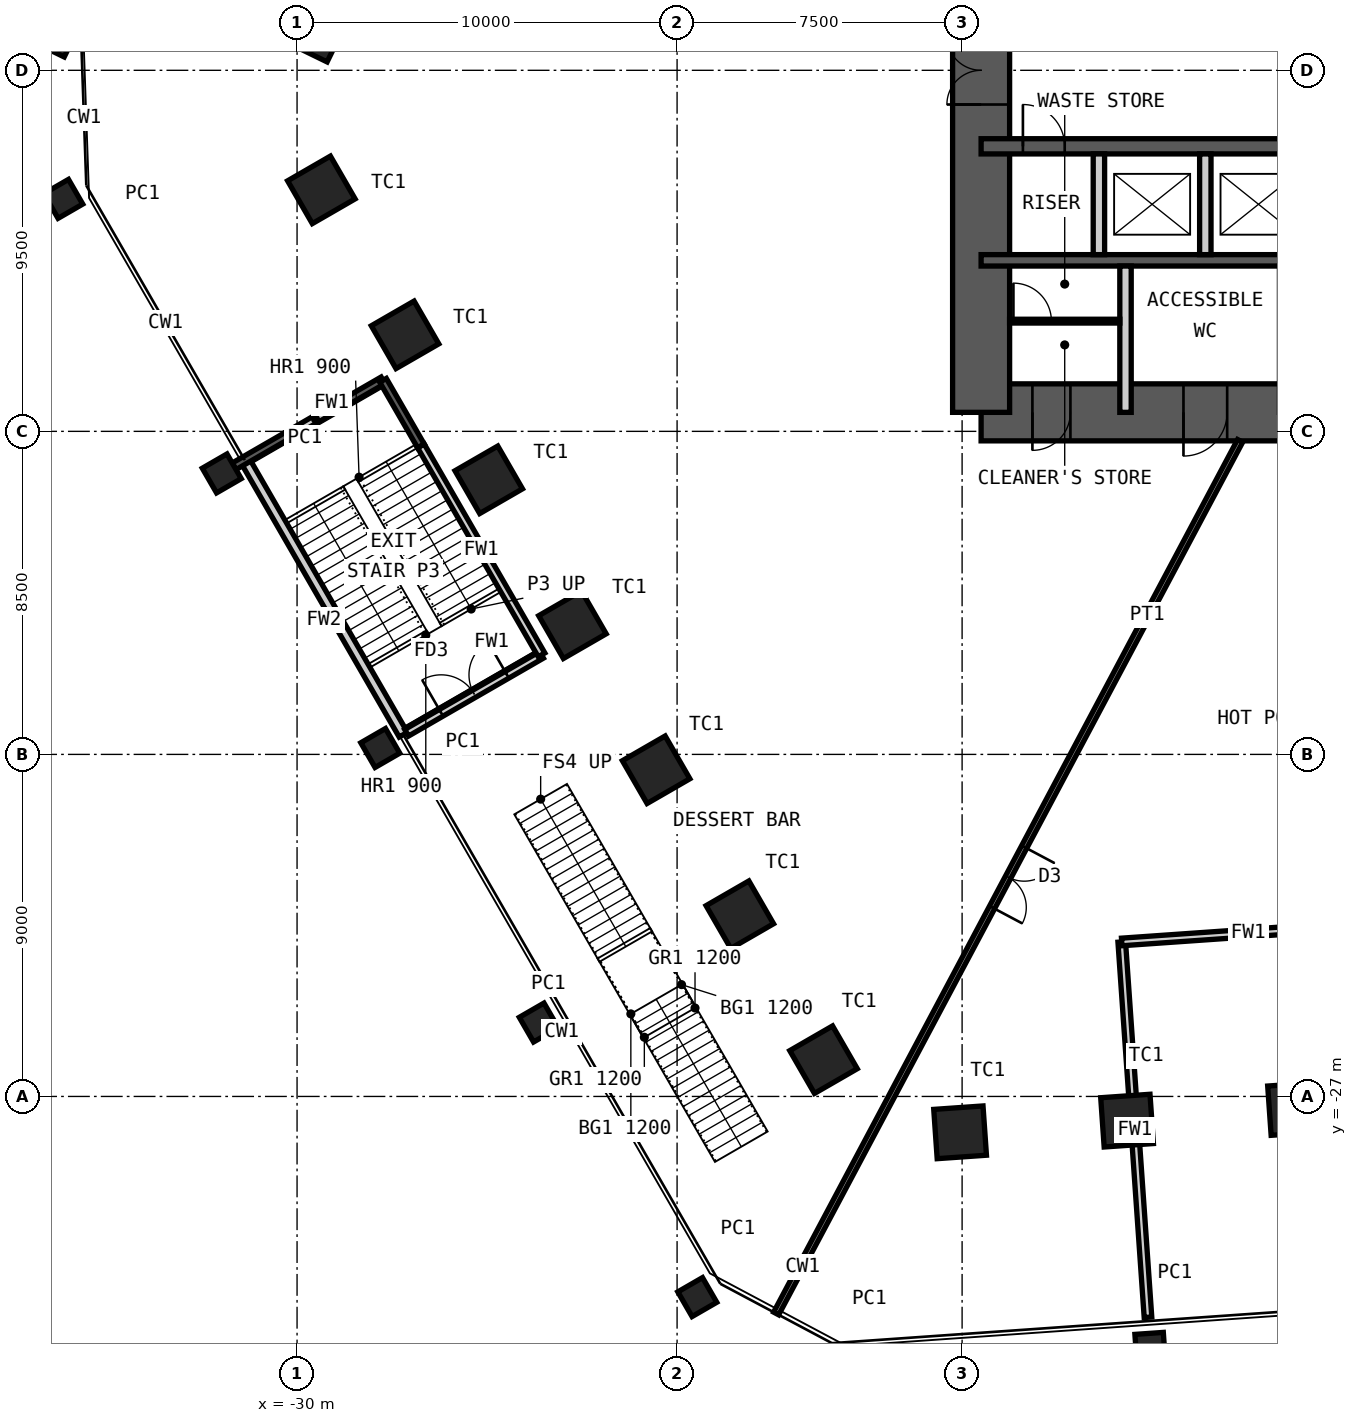
"""IFC4 building model, lengths in metres.
Left out: names, types, materials, properties, quantities, classifications, styles, units other than length and angle.
Written with IfcOpenShell. Run it as: python <this file> out.ifc"""

import sys

from ifc_helpers import new_model, si_unit, direction, frame, frame_2d, origin, origin_2d, place, context, subcontext, project, spatial, rectangle, hollow_rectangle, extrude, element, fill, save


model = new_model("IFC4")
c1 = context("Model", 3, precision=1e-05, world=origin(), true_north=direction((0.0, 1.0)))
c2 = subcontext(c1, "Body", "Model", "MODEL_VIEW")
j1 = project(units=[si_unit("LENGTHUNIT", "METRE"), si_unit("PLANEANGLEUNIT", "RADIAN")], contexts=[c1])
p1 = place(None, origin())
s1 = spatial("IfcSite", under=j1, at=p1, CompositionType="ELEMENT")
p2 = place(p1, origin())
s2 = spatial("IfcBuilding", under=s1, at=p2, CompositionType="ELEMENT")
p3 = place(p2, frame((0.0, 0.0, 6.0)))
s3 = spatial("IfcBuildingStorey", under=s2, at=p3, CompositionType="ELEMENT", Elevation=6.0)
for number, where, z_axis, x_axis in (
    (1, (-3.765, -27.329, 0.0), (0.0, 0.0, 1.0), (0.998, 0.07, 0.0)),
    (2, (-8.159, -27.636, 0.0), (0.0, 0.0, 1.0), (0.998, 0.07, 0.0)),
    (3, (-12.553, -27.944, 0.0), (0.0, 0.0, 1.0), (0.998, 0.07, 0.0)),
    (4, (-16.147, -26.033, 0.0), (0.0, 0.0, 1.0), (0.5, -0.866, 0.0)),
    (5, (-18.349, -22.218, 0.0), (0.0, 0.0, 1.0), (0.5, -0.866, 0.0)),
    (6, (-20.552, -18.404, 0.0), (0.0, 0.0, 1.0), (0.5, -0.866, 0.0)),
    (7, (-22.754, -14.589, 0.0), (0.0, 0.0, 1.0), (0.5, -0.866, 0.0)),
    (8, (-24.956, -10.775, 0.0), (0.0, 0.0, 1.0), (0.5, -0.866, 0.0)),
    (9, (-27.158, -6.96, 0.0), (0.0, 0.0, 1.0), (0.5, -0.866, 0.0)),
    (10, (-29.361, -3.146, 0.0), (0.0, 0.0, 1.0), (0.5, -0.866, 0.0)),
    (11, (-29.509, 1.09, 0.0), (0.0, 0.0, 1.0), (-0.438, -0.899, 0.0)),
):
    element("IfcColumn", number, at=place(p3, frame(where, z_axis=z_axis, x_axis=x_axis)), inside=s3, PredefinedType="COLUMN", context=c2, shape_type="SweptSolid", body=[
        extrude(hollow_rectangle(XDim=1.3, YDim=1.3, WallThickness=0.1, at=origin_2d()), origin(), (0.0, 0.0, 1.0), 6.0),
    ])
for number, where, z_axis, x_axis in (
    (12, (-7.553, -33.609, 0.0), (0.0, 0.0, 1.0), (0.998, 0.07, 0.0)),
    (13, (-19.469, -32.28, 0.0), (0.0, 0.0, 1.0), (0.5, -0.866, 0.0)),
    (14, (-23.639, -25.055, 0.0), (0.0, 0.0, 1.0), (0.5, -0.866, 0.0)),
    (15, (-27.81, -17.831, 0.0), (0.0, 0.0, 1.0), (0.5, -0.866, 0.0)),
    (16, (-31.981, -10.607, 0.0), (0.0, 0.0, 1.0), (0.5, -0.866, 0.0)),
    (17, (-36.3, 0.853, 0.0), (0.0, 0.0, 1.0), (-0.438, -0.899, 0.0)),
    (18, (-36.152, -3.383, 0.0), (0.0, 0.0, 1.0), (0.5, -0.866, 0.0)),
):
    element("IfcColumn", number, at=place(p3, frame(where, z_axis=z_axis, x_axis=x_axis)), inside=s3, PredefinedType="COLUMN", context=c2, shape_type="SweptSolid", body=[
        extrude(hollow_rectangle(XDim=0.75, YDim=0.75, WallThickness=0.036, at=origin_2d()), origin(), (0.0, 0.0, 1.0), 6.0),
    ])
p4 = place(p3, frame((-12.0, -9.0, 0.0), z_axis=(0.0, 0.0, 1.0), x_axis=(1.0, 0.0, 0.0)))
e19 = element("IfcWall", 19, at=p4, inside=s3, PredefinedType="SHEAR", context=c2, shape_type="SweptSolid", body=[
    extrude(rectangle(XDim=24.0, YDim=1.5, at=frame_2d((12.0, 0.0))), origin(), (0.0, 0.0, 1.0), 6.0),
])
p5 = place(p4, frame((1.35, 0.0, 0.0)))
e20 = element("IfcOpeningElement", 20, at=p5, cuts=e19, PredefinedType="OPENING", context=c2, shape_type="SweptSolid", body=[
    extrude(rectangle(XDim=1.0, YDim=2.1, at=frame_2d((0.5, 1.05))), frame((0.0, 0.76, 0.0), z_axis=(0.0, -1.0, 0.0), x_axis=(1.0, 0.0, 0.0)), (0.0, 0.0, 1.0), 1.52),
])
p6 = place(p4, frame((5.325, 0.0, 0.0)))
e21 = element("IfcOpeningElement", 21, at=p6, cuts=e19, PredefinedType="OPENING", context=c2, shape_type="SweptSolid", body=[
    extrude(rectangle(XDim=1.15, YDim=2.1, at=frame_2d((0.575, 1.05))), frame((0.0, 0.76, 0.0), z_axis=(0.0, -1.0, 0.0), x_axis=(1.0, 0.0, 0.0)), (0.0, 0.0, 1.0), 1.52),
])
p7 = place(p4, frame((12.6, 0.0, 0.0)))
e22 = element("IfcOpeningElement", 22, at=p7, cuts=e19, PredefinedType="OPENING", context=c2, shape_type="SweptSolid", body=[
    extrude(rectangle(XDim=1.0, YDim=2.1, at=frame_2d((0.5, 1.05))), frame((0.0, 0.76, 0.0), z_axis=(0.0, -1.0, 0.0), x_axis=(1.0, 0.0, 0.0)), (0.0, 0.0, 1.0), 1.52),
])
p8 = place(p3, frame((-12.0, -9.0, 0.0), z_axis=(0.0, 0.0, 1.0), x_axis=(0.0, 1.0, 0.0)))
e23 = element("IfcWall", 23, at=p8, inside=s3, PredefinedType="SHEAR", context=c2, shape_type="SweptSolid", body=[
    extrude(rectangle(XDim=18.0, YDim=1.5, at=frame_2d((9.0, 0.0))), origin(), (0.0, 0.0, 1.0), 6.0),
])
p9 = place(p8, frame((8.1, 0.0, 0.0)))
e24 = element("IfcOpeningElement", 24, at=p9, cuts=e23, PredefinedType="OPENING", context=c2, shape_type="SweptSolid", body=[
    extrude(rectangle(XDim=1.8, YDim=2.1, at=frame_2d((0.9, 1.05))), frame((0.0, 0.76, 0.0), z_axis=(0.0, -1.0, 0.0), x_axis=(1.0, 0.0, 0.0)), (0.0, 0.0, 1.0), 1.52),
])
p10 = place(p3, frame((-12.0, -2.0, 0.0), z_axis=(0.0, 0.0, 1.0), x_axis=(1.0, 0.0, 0.0)))
e25 = element("IfcWall", 25, at=p10, inside=s3, PredefinedType="SHEAR", context=c2, shape_type="SweptSolid", body=[
    extrude(rectangle(XDim=24.0, YDim=0.4, at=frame_2d((12.0, 0.0))), origin(), (0.0, 0.0, 1.0), 6.0),
])
p11 = place(p10, frame((1.1, 0.0, 0.0)))
e26 = element("IfcOpeningElement", 26, at=p11, cuts=e25, PredefinedType="OPENING", context=c2, shape_type="SweptSolid", body=[
    extrude(rectangle(XDim=1.1, YDim=2.1, at=frame_2d((0.55, 1.05))), frame((0.0, 0.21, 0.0), z_axis=(0.0, -1.0, 0.0), x_axis=(1.0, 0.0, 0.0)), (0.0, 0.0, 1.0), 0.42),
])
p12 = place(p10, frame((13.55, 0.0, 0.0)))
e27 = element("IfcOpeningElement", 27, at=p12, cuts=e25, PredefinedType="OPENING", context=c2, shape_type="SweptSolid", body=[
    extrude(rectangle(XDim=1.1, YDim=2.1, at=frame_2d((0.55, 1.05))), frame((0.0, 0.21, 0.0), z_axis=(0.0, -1.0, 0.0), x_axis=(1.0, 0.0, 0.0)), (0.0, 0.0, 1.0), 0.42),
])
p13 = place(p10, frame((20.7, 0.0, 0.0)))
e28 = element("IfcOpeningElement", 28, at=p13, cuts=e25, PredefinedType="OPENING", context=c2, shape_type="SweptSolid", body=[
    extrude(rectangle(XDim=1.1, YDim=2.1, at=frame_2d((0.55, 1.05))), frame((0.0, 0.21, 0.0), z_axis=(0.0, -1.0, 0.0), x_axis=(1.0, 0.0, 0.0)), (0.0, 0.0, 1.0), 0.42),
])
p14 = place(p3, frame((-12.0, -5.0, 0.0), z_axis=(0.0, 0.0, 1.0), x_axis=(1.0, 0.0, 0.0)))
e29 = element("IfcWall", 29, at=p14, inside=s3, PredefinedType="SHEAR", context=c2, shape_type="SweptSolid", body=[
    extrude(rectangle(XDim=24.0, YDim=0.3, at=frame_2d((12.0, 0.0))), origin(), (0.0, 0.0, 1.0), 6.0),
])
for number, where, z_axis, x_axis in (
    (30, (-8.9, -4.85, 0.0), (0.0, 0.0, 1.0), (0.0, 1.0, 0.0)),
    (31, (-6.1, -4.85, 0.0), (0.0, 0.0, 1.0), (0.0, 1.0, 0.0)),
):
    element("IfcWall", number, at=place(p3, frame(where, z_axis=z_axis, x_axis=x_axis)), inside=s3, PredefinedType="PARTITIONING", context=c2, shape_type="SweptSolid", body=[
        extrude(rectangle(XDim=2.65, YDim=0.3, at=frame_2d((1.325, 0.0))), origin(), (0.0, 0.0, 1.0), 5.78),
    ])
p15 = place(p3, frame((-8.2, -9.0, 0.0), z_axis=(0.0, 0.0, 1.0), x_axis=(0.0, 1.0, 0.0)))
e32 = element("IfcWall", 32, at=p15, inside=s3, PredefinedType="PARTITIONING", context=c2, shape_type="SweptSolid", body=[
    extrude(rectangle(XDim=3.85, YDim=0.3, at=frame_2d((1.925, 0.0))), origin(), (0.0, 0.0, 1.0), 5.78),
])
p16 = place(p3, frame((-27.204, -17.481, 0.0), z_axis=(0.0, 0.0, 1.0), x_axis=(-0.500004511595, 0.866022798998, 0.0)))
e33 = element("IfcWall", 33, at=p16, inside=s3, PredefinedType="SOLIDWALL", context=c2, shape_type="SweptSolid", body=[
    extrude(rectangle(XDim=8.342, YDim=0.25, at=frame_2d((4.171, 0.0))), origin(), (0.0, 0.0, 1.0), 5.75),
])
p17 = place(p3, frame((-11.25, -6.6, 0.0), z_axis=(0.0, 0.0, 1.0), x_axis=(1.0, 0.0, 0.0)))
e34 = element("IfcWall", 34, at=p17, inside=s3, PredefinedType="PARTITIONING", context=c2, shape_type="SweptSolid", body=[
    extrude(rectangle(XDim=2.9, YDim=0.1, at=frame_2d((1.45, 0.0))), origin(), (0.0, 0.0, 1.0), 5.78),
])
p18 = place(p17, frame((0.1, 0.0, 0.0)))
e35 = element("IfcOpeningElement", 35, at=p18, cuts=e34, PredefinedType="OPENING", context=c2, shape_type="SweptSolid", body=[
    extrude(rectangle(XDim=1.0, YDim=2.4, at=frame_2d((0.5, 1.2))), frame((0.0, 0.06, 0.0), z_axis=(0.0, -1.0, 0.0), x_axis=(1.0, 0.0, 0.0)), (0.0, 0.0, 1.0), 0.12),
])
p19 = place(p3, frame((-7.609, -32.811, 0.0), z_axis=(0.0, 0.0, 1.0), x_axis=(-0.069764341483, 0.997563500063, 0.0)))
e36 = element("IfcWall", 36, at=p19, inside=s3, PredefinedType="PARTITIONING", context=c2, shape_type="SweptSolid", body=[
    extrude(rectangle(XDim=9.9, YDim=0.2, at=frame_2d((4.95, 0.0))), origin(), (0.0, 0.0, 1.0), 5.75),
])
p20 = place(p3, frame((8.344, -21.771, 0.0), z_axis=(0.0, 0.0, 1.0), x_axis=(-0.997563959397, -0.069757773133, 0.0)))
e37 = element("IfcWall", 37, at=p20, inside=s3, PredefinedType="PARTITIONING", context=c2, shape_type="SweptSolid", body=[
    extrude(rectangle(XDim=16.684, YDim=0.2, at=frame_2d((8.342, 0.0))), origin(), (0.0, 0.0, 1.0), 5.75),
])
p21 = place(p20, frame((7.342, 0.0, 0.0)))
e38 = element("IfcOpeningElement", 38, at=p21, cuts=e37, PredefinedType="OPENING", context=c2, shape_type="SweptSolid", body=[
    extrude(rectangle(XDim=2.0, YDim=2.4, at=frame_2d((1.0, 1.2))), frame((0.0, 0.11, 0.0), z_axis=(0.0, -1.0, 0.0), x_axis=(1.0, 0.0, 0.0)), (0.0, 0.0, 1.0), 0.22),
])
p22 = place(p3, frame((-5.184, -9.75, 0.0), z_axis=(0.0, 0.0, 1.0), x_axis=(-0.469477354847, -0.882944513141, 0.0)))
e39 = element("IfcWall", 39, at=p22, inside=s3, PredefinedType="PARTITIONING", context=c2, shape_type="SweptSolid", body=[
    extrude(rectangle(XDim=26.005, YDim=0.15, at=frame_2d((13.002, 0.0))), origin(), (0.0, 0.0, 1.0), 5.75),
])
p23 = place(p22, frame((12.103, 0.0, 0.0)))
e40 = element("IfcOpeningElement", 40, at=p23, cuts=e39, PredefinedType="OPENING", context=c2, shape_type="SweptSolid", body=[
    extrude(rectangle(XDim=1.8, YDim=2.4, at=frame_2d((0.9, 1.2))), frame((0.0, 0.085, 0.0), z_axis=(0.0, -1.0, 0.0), x_axis=(1.0, 0.0, 0.0)), (0.0, 0.0, 1.0), 0.17),
])
p24 = place(p3, frame((-27.117, -17.431, 0.0), z_axis=(0.0, 0.0, 1.0), x_axis=(0.8660249478, 0.500000789788, 0.0)))
e41 = element("IfcWall", 41, at=p24, inside=s3, PredefinedType="PARTITIONING", context=c2, shape_type="SweptSolid", body=[
    extrude(rectangle(XDim=4.1, YDim=0.2, at=frame_2d((2.05, 0.0))), origin(), (0.0, 0.0, 1.0), 5.75),
])
p25 = place(p24, frame((1.05, 0.0, 0.0)))
e42 = element("IfcOpeningElement", 42, at=p25, cuts=e41, PredefinedType="OPENING", context=c2, shape_type="SweptSolid", body=[
    extrude(rectangle(XDim=2.0, YDim=2.4, at=frame_2d((1.0, 1.2))), frame((0.0, 0.11, 0.0), z_axis=(0.0, -1.0, 0.0), x_axis=(1.0, 0.0, 0.0)), (0.0, 0.0, 1.0), 0.22),
])
p26 = place(p3, frame((-31.656, -10.419, 0.0), z_axis=(0.0, 0.0, 1.0), x_axis=(0.866053003207, 0.499952193351, 0.0)))
e43 = element("IfcWall", 43, at=p26, inside=s3, PredefinedType="PARTITIONING", context=c2, shape_type="SweptSolid", body=[
    extrude(rectangle(XDim=1.625, YDim=0.2, at=frame_2d((0.812, 0.0))), origin(), (0.0, 0.0, 1.0), 5.75),
])
p27 = place(p3, frame((-23.567, -15.381, 0.0), z_axis=(0.0, 0.0, 1.0), x_axis=(-0.500005339912, 0.866022320763, 0.0)))
e44 = element("IfcWall", 44, at=p27, inside=s3, PredefinedType="PARTITIONING", context=c2, shape_type="SweptSolid", body=[
    extrude(rectangle(XDim=6.35, YDim=0.2, at=frame_2d((3.175, 0.0))), origin(), (0.0, 0.0, 1.0), 5.75),
])
p28 = place(p3, frame((-30.249, -9.607, 0.0), z_axis=(0.0, 0.0, 1.0), x_axis=(0.86605165483, 0.499954529098, 0.0)))
e45 = element("IfcWall", 45, at=p28, inside=s3, PredefinedType="PARTITIONING", context=c2, shape_type="SweptSolid", body=[
    extrude(rectangle(XDim=1.7, YDim=0.2, at=frame_2d((0.85, 0.0))), origin(), (0.0, 0.0, 1.0), 5.75),
])
p29 = place(p3, frame((-28.777, -8.757, 0.0), z_axis=(0.0, 0.0, 1.0), x_axis=(0.866006032174, 0.500033551112, 0.0)))
e46 = element("IfcWall", 46, at=p29, inside=s3, PredefinedType="PARTITIONING", context=c2, shape_type="SweptSolid", body=[
    extrude(rectangle(XDim=1.2, YDim=0.2, at=frame_2d((0.6, 0.0))), origin(), (0.0, 0.0, 1.0), 5.75),
])
p30 = place(p3, frame((-26.742, -9.882, 0.0), z_axis=(0.0, 0.0, 1.0), x_axis=(-0.500001870701, 0.866024323732, 0.0)))
e47 = element("IfcWall", 47, at=p30, inside=s3, PredefinedType="PARTITIONING", context=c2, shape_type="SweptSolid", body=[
    extrude(rectangle(XDim=1.992, YDim=0.2, at=frame_2d((0.996, 0.0))), origin(), (0.0, 0.0, 1.0), 5.75),
])
p31 = place(p5, origin())
e48 = element("IfcDoor", 48, at=p31, inside=s3, OperationType="SINGLE_SWING_LEFT", PredefinedType="DOOR", context=c2, shape_type="SweptSolid", body=[
    extrude(rectangle(XDim=1.0, YDim=2.1, at=frame_2d((0.5, 1.05))), frame((0.0, 0.025, 0.0), z_axis=(0.0, -1.0, 0.0), x_axis=(1.0, 0.0, 0.0)), (0.0, 0.0, 1.0), 0.05),
])
fill(e20, e48)
p32 = place(p6, origin())
e49 = element("IfcDoor", 49, at=p32, inside=s3, OperationType="SINGLE_SWING_LEFT", PredefinedType="DOOR", context=c2, shape_type="SweptSolid", body=[
    extrude(rectangle(XDim=1.15, YDim=2.1, at=frame_2d((0.575, 1.05))), frame((0.0, 0.025, 0.0), z_axis=(0.0, -1.0, 0.0), x_axis=(1.0, 0.0, 0.0)), (0.0, 0.0, 1.0), 0.05),
])
fill(e21, e49)
p33 = place(p11, origin())
e50 = element("IfcDoor", 50, at=p33, inside=s3, OperationType="SINGLE_SWING_RIGHT", PredefinedType="DOOR", context=c2, shape_type="SweptSolid", body=[
    extrude(rectangle(XDim=1.1, YDim=2.1, at=frame_2d((0.55, 1.05))), frame((0.0, 0.025, 0.0), z_axis=(0.0, -1.0, 0.0), x_axis=(1.0, 0.0, 0.0)), (0.0, 0.0, 1.0), 0.05),
])
fill(e26, e50)
p34 = place(p9, origin())
e51 = element("IfcDoor", 51, at=p34, inside=s3, OperationType="DOUBLE_DOOR_DOUBLE_SWING", PredefinedType="DOOR", context=c2, shape_type="SweptSolid", body=[
    extrude(rectangle(XDim=1.8, YDim=2.1, at=frame_2d((0.9, 1.05))), frame((0.0, 0.025, 0.0), z_axis=(0.0, -1.0, 0.0), x_axis=(1.0, 0.0, 0.0)), (0.0, 0.0, 1.0), 0.05),
])
fill(e24, e51)
p35 = place(p18, origin())
e52 = element("IfcDoor", 52, at=p35, inside=s3, OperationType="SINGLE_SWING_RIGHT", PredefinedType="DOOR", context=c2, shape_type="SweptSolid", body=[
    extrude(rectangle(XDim=1.0, YDim=2.4, at=frame_2d((0.5, 1.2))), frame((0.0, 0.025, 0.0), z_axis=(0.0, -1.0, 0.0), x_axis=(1.0, 0.0, 0.0)), (0.0, 0.0, 1.0), 0.05),
])
fill(e35, e52)
p36 = place(p23, origin())
e53 = element("IfcDoor", 53, at=p36, inside=s3, OperationType="DOUBLE_DOOR_DOUBLE_SWING", PredefinedType="DOOR", context=c2, shape_type="SweptSolid", body=[
    extrude(rectangle(XDim=1.8, YDim=2.4, at=frame_2d((0.9, 1.2))), frame((0.0, 0.025, 0.0), z_axis=(0.0, -1.0, 0.0), x_axis=(1.0, 0.0, 0.0)), (0.0, 0.0, 1.0), 0.05),
])
fill(e40, e53)
p37 = place(p25, origin())
e54 = element("IfcDoor", 54, at=p37, inside=s3, OperationType="DOUBLE_DOOR_DOUBLE_SWING", PredefinedType="DOOR", context=c2, shape_type="SweptSolid", body=[
    extrude(rectangle(XDim=2.0, YDim=2.4, at=frame_2d((1.0, 1.2))), frame((0.0, 0.025, 0.0), z_axis=(0.0, -1.0, 0.0), x_axis=(1.0, 0.0, 0.0)), (0.0, 0.0, 1.0), 0.05),
])
fill(e42, e54)
save(model, sys.argv[1])
